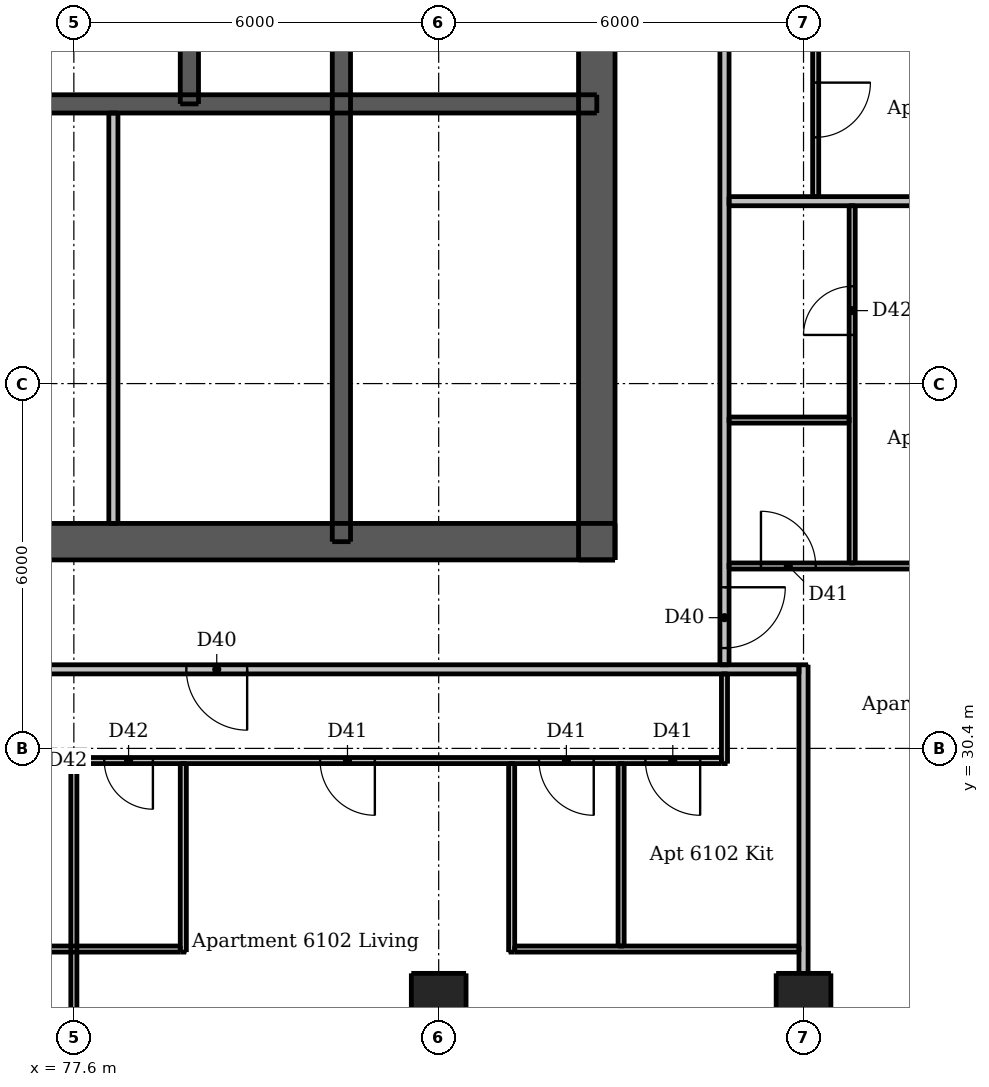
"""IFC4 building model, lengths in metres.
Left out: names, types, materials, properties, quantities, classifications, styles, units other than length and angle.
Written with IfcOpenShell. Run it as: python <this file> out.ifc"""

import sys

from ifc_helpers import new_model, si_unit, direction, frame, frame_2d, origin, origin_2d, place, context, subcontext, project, spatial, rectangle, extrude, element, fill, save


model = new_model("IFC4")
c1 = context("Model", 3, precision=1e-05, world=origin(), true_north=direction((0.0, 1.0)))
c2 = subcontext(c1, "Body", "Model", "MODEL_VIEW")
j1 = project(units=[si_unit("LENGTHUNIT", "METRE"), si_unit("PLANEANGLEUNIT", "RADIAN")], contexts=[c1])
p1 = place(None, origin())
s1 = spatial("IfcSite", under=j1, at=p1, CompositionType="ELEMENT")
p2 = place(p1, origin())
s2 = spatial("IfcBuilding", under=s1, at=p2, CompositionType="ELEMENT")
p3 = place(p2, frame((0.0, 0.0, 226.6)))
s3 = spatial("IfcBuildingStorey", under=s2, at=p3, CompositionType="ELEMENT", Elevation=226.6)
p4 = place(p3, frame((62.5, 33.8, 0.0), z_axis=(0.0, 0.0, 1.0), x_axis=(1.0, 0.0, 0.0)))
e1 = element("IfcWall", 1, at=p4, inside=s3, PredefinedType="SHEAR", context=c2, shape_type="SweptSolid", body=[
    extrude(rectangle(XDim=24.0, YDim=0.6, at=frame_2d((12.0, 0.0))), origin(), (0.0, 0.0, 1.0), 2.95),
])
p5 = place(p4, frame((1.925, 0.0, 0.0)))
e2 = element("IfcOpeningElement", 2, at=p5, cuts=e1, PredefinedType="OPENING", context=c2, shape_type="SweptSolid", body=[
    extrude(rectangle(XDim=1.1, YDim=2.1, at=frame_2d((0.55, 1.05))), frame((0.0, 0.31, 0.0), z_axis=(0.0, -1.0, 0.0), x_axis=(1.0, 0.0, 0.0)), (0.0, 0.0, 1.0), 0.62),
])
p6 = place(p4, frame((20.975, 0.0, 0.0)))
e3 = element("IfcOpeningElement", 3, at=p6, cuts=e1, PredefinedType="OPENING", context=c2, shape_type="SweptSolid", body=[
    extrude(rectangle(XDim=1.1, YDim=2.1, at=frame_2d((0.55, 1.05))), frame((0.0, 0.31, 0.0), z_axis=(0.0, -1.0, 0.0), x_axis=(1.0, 0.0, 0.0)), (0.0, 0.0, 1.0), 0.62),
])
p7 = place(p4, frame((8.0, 0.0, 0.0)))
e4 = element("IfcOpeningElement", 4, at=p7, cuts=e1, PredefinedType="OPENING", context=c2, shape_type="SweptSolid", body=[
    extrude(rectangle(XDim=1.1, YDim=2.1, at=frame_2d((0.55, 1.05))), frame((0.0, 0.31, 0.0), z_axis=(0.0, -1.0, 0.0), x_axis=(1.0, 0.0, 0.0)), (0.0, 0.0, 1.0), 0.62),
])
p8 = place(p4, frame((13.5, 0.0, 0.0)))
e5 = element("IfcOpeningElement", 5, at=p8, cuts=e1, PredefinedType="OPENING", context=c2, shape_type="SweptSolid", body=[
    extrude(rectangle(XDim=0.9, YDim=2.1, at=frame_2d((0.45, 1.05))), frame((0.0, 0.31, 0.0), z_axis=(0.0, -1.0, 0.0), x_axis=(1.0, 0.0, 0.0)), (0.0, 0.0, 1.0), 0.62),
])
p9 = place(p4, frame((17.1, 0.0, 0.0)))
e6 = element("IfcOpeningElement", 6, at=p9, cuts=e1, PredefinedType="OPENING", context=c2, shape_type="SweptSolid", body=[
    extrude(rectangle(XDim=0.9, YDim=2.1, at=frame_2d((0.45, 1.05))), frame((0.0, 0.31, 0.0), z_axis=(0.0, -1.0, 0.0), x_axis=(1.0, 0.0, 0.0)), (0.0, 0.0, 1.0), 0.62),
])
p10 = place(p3, frame((86.2, 33.5, 0.0), z_axis=(0.0, 0.0, 1.0), x_axis=(0.0, 1.0, 0.0)))
e7 = element("IfcWall", 7, at=p10, inside=s3, PredefinedType="SHEAR", context=c2, shape_type="SweptSolid", body=[
    extrude(rectangle(XDim=24.0, YDim=0.6, at=frame_2d((12.0, 0.0))), origin(), (0.0, 0.0, 1.0), 2.95),
])
p11 = place(p10, frame((11.2, 0.0, 0.0)))
e8 = element("IfcOpeningElement", 8, at=p11, cuts=e7, PredefinedType="OPENING", context=c2, shape_type="SweptSolid", body=[
    extrude(rectangle(XDim=1.6, YDim=2.1, at=frame_2d((0.8, 1.05))), frame((0.0, 0.31, 0.0), z_axis=(0.0, -1.0, 0.0), x_axis=(1.0, 0.0, 0.0)), (0.0, 0.0, 1.0), 0.62),
])
p12 = place(p3, frame((62.8, 41.0, 0.0), z_axis=(0.0, 0.0, 1.0), x_axis=(1.0, 0.0, 0.0)))
e9 = element("IfcWall", 9, at=p12, inside=s3, PredefinedType="SHEAR", context=c2, shape_type="SweptSolid", body=[
    extrude(rectangle(XDim=23.4, YDim=0.3, at=frame_2d((11.7, 0.0))), origin(), (0.0, 0.0, 1.0), 2.95),
])
p13 = place(p3, frame((82.0, 33.8, 0.0), z_axis=(0.0, 0.0, 1.0), x_axis=(0.0, 1.0, 0.0)))
e10 = element("IfcWall", 10, at=p13, inside=s3, PredefinedType="SHEAR", context=c2, shape_type="SweptSolid", body=[
    extrude(rectangle(XDim=10.1, YDim=0.3, at=frame_2d((5.05, 0.0))), origin(), (0.0, 0.0, 1.0), 2.95),
])
p14 = place(p3, frame((79.5, 41.0, 0.0), z_axis=(0.0, 0.0, 1.0), x_axis=(0.0, 1.0, 0.0)))
e11 = element("IfcWall", 11, at=p14, inside=s3, PredefinedType="SHEAR", context=c2, shape_type="SweptSolid", body=[
    extrude(rectangle(XDim=2.9, YDim=0.3, at=frame_2d((1.45, 0.0))), origin(), (0.0, 0.0, 1.0), 2.95),
])
for number, where, z_axis, x_axis in (
    (12, (83.6, 26.25, 0.0), (0.0, 0.0, 1.0), (1.0, 0.0, 0.0)),
    (13, (89.6, 26.25, 0.0), (0.0, 0.0, 1.0), (1.0, 0.0, 0.0)),
):
    element("IfcColumn", number, at=place(p3, frame(where, z_axis=z_axis, x_axis=x_axis)), inside=s3, PredefinedType="COLUMN", context=c2, shape_type="SweptSolid", body=[
        extrude(rectangle(XDim=0.9, YDim=0.9, at=origin_2d()), origin(), (0.0, 0.0, 1.0), 2.95),
    ])
p15 = place(p3, frame((78.25, 34.1, 0.0), z_axis=(0.0, 0.0, 1.0), x_axis=(0.0, 1.0, 0.0)))
e14 = element("IfcWall", 14, at=p15, inside=s3, PredefinedType="PLUMBINGWALL", context=c2, shape_type="SweptSolid", body=[
    extrude(rectangle(XDim=6.75, YDim=0.15, at=frame_2d((3.375, 0.0))), origin(), (0.0, 0.0, 1.0), 2.95),
])
p16 = place(p3, frame((77.6, 24.0, 0.0), z_axis=(0.0, 0.0, 1.0), x_axis=(0.0, 1.0, 0.0)))
e15 = element("IfcWall", 15, at=p16, inside=s3, PredefinedType="PARTITIONING", context=c2, shape_type="SweptSolid", body=[
    extrude(rectangle(XDim=6.15, YDim=0.1, at=frame_2d((3.075, 0.0))), origin(), (0.0, 0.0, 1.0), 2.332),
])
for number, where, z_axis, x_axis in (
    (16, (79.4, 27.05, 0.0), (0.0, 0.0, 1.0), (0.0, 1.0, 0.0)),
    (17, (84.8, 27.05, 0.0), (0.0, 0.0, 1.0), (0.0, 1.0, 0.0)),
):
    element("IfcWall", number, at=place(p3, frame(where, z_axis=z_axis, x_axis=x_axis)), inside=s3, PredefinedType="PARTITIONING", context=c2, shape_type="SweptSolid", body=[
        extrude(rectangle(XDim=3.1, YDim=0.1, at=frame_2d((1.55, 0.0))), origin(), (0.0, 0.0, 1.0), 2.95),
    ])
p17 = place(p3, frame((86.6, 27.15, 0.0), z_axis=(0.0, 0.0, 1.0), x_axis=(0.0, 1.0, 0.0)))
e18 = element("IfcWall", 18, at=p17, inside=s3, PredefinedType="PARTITIONING", context=c2, shape_type="SweptSolid", body=[
    extrude(rectangle(XDim=3.0, YDim=0.1, at=frame_2d((1.5, 0.0))), origin(), (0.0, 0.0, 1.0), 2.95),
])
p18 = place(p3, frame((88.3, 30.15, 0.0), z_axis=(0.0, 0.0, 1.0), x_axis=(0.0, 1.0, 0.0)))
e19 = element("IfcWall", 19, at=p18, inside=s3, PredefinedType="PARTITIONING", context=c2, shape_type="SweptSolid", body=[
    extrude(rectangle(XDim=1.475, YDim=0.1, at=frame_2d((0.738, 0.0))), origin(), (0.0, 0.0, 1.0), 2.95),
])
p19 = place(p3, frame((89.8, 60.325, 0.0), z_axis=(0.0, 0.0, 1.0), x_axis=(0.0, -1.0, 0.0)))
e20 = element("IfcWall", 20, at=p19, inside=s3, PredefinedType="PARTITIONING", context=c2, shape_type="SweptSolid", body=[
    extrude(rectangle(XDim=20.85, YDim=0.1, at=frame_2d((10.425, 0.0))), origin(), (0.0, 0.0, 1.0), 2.95),
])
p20 = place(p19, frame((6.075, 0.0, 0.0)))
e21 = element("IfcOpeningElement", 21, at=p20, cuts=e20, PredefinedType="OPENING", context=c2, shape_type="SweptSolid", body=[
    extrude(rectangle(XDim=0.9, YDim=2.1, at=frame_2d((0.45, 1.05))), frame((0.0, 0.06, 0.0), z_axis=(0.0, -1.0, 0.0), x_axis=(1.0, 0.0, 0.0)), (0.0, 0.0, 1.0), 0.12),
])
p21 = place(p19, frame((0.975, 0.0, 0.0)))
e22 = element("IfcOpeningElement", 22, at=p21, cuts=e20, PredefinedType="OPENING", context=c2, shape_type="SweptSolid", body=[
    extrude(rectangle(XDim=0.9, YDim=2.1, at=frame_2d((0.45, 1.05))), frame((0.0, 0.06, 0.0), z_axis=(0.0, -1.0, 0.0), x_axis=(1.0, 0.0, 0.0)), (0.0, 0.0, 1.0), 0.12),
])
p22 = place(p19, frame((10.625, 0.0, 0.0)))
e23 = element("IfcOpeningElement", 23, at=p22, cuts=e20, PredefinedType="OPENING", context=c2, shape_type="SweptSolid", body=[
    extrude(rectangle(XDim=0.8, YDim=2.1, at=frame_2d((0.4, 1.05))), frame((0.0, 0.06, 0.0), z_axis=(0.0, -1.0, 0.0), x_axis=(1.0, 0.0, 0.0)), (0.0, 0.0, 1.0), 0.12),
])
p23 = place(p19, frame((18.975, 0.0, 0.0)))
e24 = element("IfcOpeningElement", 24, at=p23, cuts=e20, PredefinedType="OPENING", context=c2, shape_type="SweptSolid", body=[
    extrude(rectangle(XDim=0.9, YDim=2.1, at=frame_2d((0.45, 1.05))), frame((0.0, 0.06, 0.0), z_axis=(0.0, -1.0, 0.0), x_axis=(1.0, 0.0, 0.0)), (0.0, 0.0, 1.0), 0.12),
])
p24 = place(p19, frame((15.675, 0.0, 0.0)))
e25 = element("IfcOpeningElement", 25, at=p24, cuts=e20, PredefinedType="OPENING", context=c2, shape_type="SweptSolid", body=[
    extrude(rectangle(XDim=0.9, YDim=2.1, at=frame_2d((0.45, 1.05))), frame((0.0, 0.06, 0.0), z_axis=(0.0, -1.0, 0.0), x_axis=(1.0, 0.0, 0.0)), (0.0, 0.0, 1.0), 0.12),
])
p25 = place(p19, frame((12.725, 0.0, 0.0)))
e26 = element("IfcOpeningElement", 26, at=p25, cuts=e20, PredefinedType="OPENING", context=c2, shape_type="SweptSolid", body=[
    extrude(rectangle(XDim=0.8, YDim=2.1, at=frame_2d((0.4, 1.05))), frame((0.0, 0.06, 0.0), z_axis=(0.0, -1.0, 0.0), x_axis=(1.0, 0.0, 0.0)), (0.0, 0.0, 1.0), 0.12),
])
p26 = place(p3, frame((90.4, 33.45, 0.0), z_axis=(0.0, 0.0, 1.0), x_axis=(0.0, 1.0, 0.0)))
e27 = element("IfcWall", 27, at=p26, inside=s3, PredefinedType="PARTITIONING", context=c2, shape_type="SweptSolid", body=[
    extrude(rectangle(XDim=5.875, YDim=0.1, at=frame_2d((2.938, 0.0))), origin(), (0.0, 0.0, 1.0), 2.95),
])
p27 = place(p26, frame((3.75, 0.0, 0.0)))
e28 = element("IfcOpeningElement", 28, at=p27, cuts=e27, PredefinedType="OPENING", context=c2, shape_type="SweptSolid", body=[
    extrude(rectangle(XDim=0.8, YDim=2.1, at=frame_2d((0.4, 1.05))), frame((0.0, 0.06, 0.0), z_axis=(0.0, -1.0, 0.0), x_axis=(1.0, 0.0, 0.0)), (0.0, 0.0, 1.0), 0.12),
])
p28 = place(p3, frame((88.375, 35.8, 0.0), z_axis=(0.0, 0.0, 1.0), x_axis=(1.0, 0.0, 0.0)))
e29 = element("IfcWall", 29, at=p28, inside=s3, PredefinedType="PARTITIONING", context=c2, shape_type="SweptSolid", body=[
    extrude(rectangle(XDim=1.975, YDim=0.1, at=frame_2d((0.988, 0.0))), origin(), (0.0, 0.0, 1.0), 2.95),
])
p29 = place(p3, frame((88.375, 33.4, 0.0), z_axis=(0.0, 0.0, 1.0), x_axis=(1.0, 0.0, 0.0)))
e30 = element("IfcWall", 30, at=p29, inside=s3, PredefinedType="PARTITIONING", context=c2, shape_type="SweptSolid", body=[
    extrude(rectangle(XDim=7.625, YDim=0.1, at=frame_2d((3.812, 0.0))), origin(), (0.0, 0.0, 1.0), 2.95),
])
p30 = place(p29, frame((0.525, 0.0, 0.0)))
e31 = element("IfcOpeningElement", 31, at=p30, cuts=e30, PredefinedType="OPENING", context=c2, shape_type="SweptSolid", body=[
    extrude(rectangle(XDim=0.9, YDim=2.1, at=frame_2d((0.45, 1.05))), frame((0.0, 0.06, 0.0), z_axis=(0.0, -1.0, 0.0), x_axis=(1.0, 0.0, 0.0)), (0.0, 0.0, 1.0), 0.12),
])
p31 = place(p29, frame((4.375, 0.0, 0.0)))
e32 = element("IfcOpeningElement", 32, at=p31, cuts=e30, PredefinedType="OPENING", context=c2, shape_type="SweptSolid", body=[
    extrude(rectangle(XDim=0.9, YDim=2.1, at=frame_2d((0.45, 1.05))), frame((0.0, 0.06, 0.0), z_axis=(0.0, -1.0, 0.0), x_axis=(1.0, 0.0, 0.0)), (0.0, 0.0, 1.0), 0.12),
])
p32 = place(p3, frame((88.25, 30.2, 0.0), z_axis=(0.0, 0.0, 1.0), x_axis=(-1.0, 0.0, 0.0)))
e33 = element("IfcWall", 33, at=p32, inside=s3, PredefinedType="PARTITIONING", context=c2, shape_type="SweptSolid", body=[
    extrude(rectangle(XDim=16.575, YDim=0.1, at=frame_2d((8.288, 0.0))), origin(), (0.0, 0.0, 1.0), 2.95),
])
p33 = place(p32, frame((5.7, 0.0, 0.0)))
e34 = element("IfcOpeningElement", 34, at=p33, cuts=e33, PredefinedType="OPENING", context=c2, shape_type="SweptSolid", body=[
    extrude(rectangle(XDim=0.9, YDim=2.1, at=frame_2d((0.45, 1.05))), frame((0.0, 0.06, 0.0), z_axis=(0.0, -1.0, 0.0), x_axis=(1.0, 0.0, 0.0)), (0.0, 0.0, 1.0), 0.12),
])
p34 = place(p32, frame((0.35, 0.0, 0.0)))
e35 = element("IfcOpeningElement", 35, at=p34, cuts=e33, PredefinedType="OPENING", context=c2, shape_type="SweptSolid", body=[
    extrude(rectangle(XDim=0.9, YDim=2.1, at=frame_2d((0.45, 1.05))), frame((0.0, 0.06, 0.0), z_axis=(0.0, -1.0, 0.0), x_axis=(1.0, 0.0, 0.0)), (0.0, 0.0, 1.0), 0.12),
])
p35 = place(p32, frame((2.1, 0.0, 0.0)))
e36 = element("IfcOpeningElement", 36, at=p35, cuts=e33, PredefinedType="OPENING", context=c2, shape_type="SweptSolid", body=[
    extrude(rectangle(XDim=0.9, YDim=2.1, at=frame_2d((0.45, 1.05))), frame((0.0, 0.06, 0.0), z_axis=(0.0, -1.0, 0.0), x_axis=(1.0, 0.0, 0.0)), (0.0, 0.0, 1.0), 0.12),
])
p36 = place(p32, frame((9.35, 0.0, 0.0)))
e37 = element("IfcOpeningElement", 37, at=p36, cuts=e33, PredefinedType="OPENING", context=c2, shape_type="SweptSolid", body=[
    extrude(rectangle(XDim=0.8, YDim=2.1, at=frame_2d((0.4, 1.05))), frame((0.0, 0.06, 0.0), z_axis=(0.0, -1.0, 0.0), x_axis=(1.0, 0.0, 0.0)), (0.0, 0.0, 1.0), 0.12),
])
p37 = place(p32, frame((14.4, 0.0, 0.0)))
e38 = element("IfcOpeningElement", 38, at=p37, cuts=e33, PredefinedType="OPENING", context=c2, shape_type="SweptSolid", body=[
    extrude(rectangle(XDim=0.9, YDim=2.1, at=frame_2d((0.45, 1.05))), frame((0.0, 0.06, 0.0), z_axis=(0.0, -1.0, 0.0), x_axis=(1.0, 0.0, 0.0)), (0.0, 0.0, 1.0), 0.12),
])
p38 = place(p32, frame((11.45, 0.0, 0.0)))
e39 = element("IfcOpeningElement", 39, at=p38, cuts=e33, PredefinedType="OPENING", context=c2, shape_type="SweptSolid", body=[
    extrude(rectangle(XDim=0.8, YDim=2.1, at=frame_2d((0.4, 1.05))), frame((0.0, 0.06, 0.0), z_axis=(0.0, -1.0, 0.0), x_axis=(1.0, 0.0, 0.0)), (0.0, 0.0, 1.0), 0.12),
])
p39 = place(p3, frame((75.25, 27.1, 0.0), z_axis=(0.0, 0.0, 1.0), x_axis=(1.0, 0.0, 0.0)))
e40 = element("IfcWall", 40, at=p39, inside=s3, PredefinedType="PARTITIONING", context=c2, shape_type="SweptSolid", body=[
    extrude(rectangle(XDim=4.1, YDim=0.1, at=frame_2d((2.05, 0.0))), origin(), (0.0, 0.0, 1.0), 2.95),
])
p40 = place(p3, frame((84.85, 27.1, 0.0), z_axis=(0.0, 0.0, 1.0), x_axis=(1.0, 0.0, 0.0)))
e41 = element("IfcWall", 41, at=p40, inside=s3, PredefinedType="PARTITIONING", context=c2, shape_type="SweptSolid", body=[
    extrude(rectangle(XDim=4.675, YDim=0.1, at=frame_2d((2.337, 0.0))), origin(), (0.0, 0.0, 1.0), 2.95),
])
p41 = place(p3, frame((88.3, 61.175, 0.0), z_axis=(0.0, 0.0, 1.0), x_axis=(0.0, -1.0, 0.0)))
e42 = element("IfcWall", 42, at=p41, inside=s3, PredefinedType="PARTITIONING", context=c2, shape_type="SweptSolid", body=[
    extrude(rectangle(XDim=29.4, YDim=0.15, at=frame_2d((14.7, 0.0))), origin(), (0.0, 0.0, 1.0), 2.95),
])
p42 = place(p41, frame((28.125, 0.0, 0.0)))
e43 = element("IfcOpeningElement", 43, at=p42, cuts=e42, PredefinedType="OPENING", context=c2, shape_type="SweptSolid", body=[
    extrude(rectangle(XDim=1.0, YDim=2.1, at=frame_2d((0.5, 1.05))), frame((0.0, 0.085, 0.0), z_axis=(0.0, -1.0, 0.0), x_axis=(1.0, 0.0, 0.0)), (0.0, 0.0, 1.0), 0.17),
])
p43 = place(p41, frame((10.775, 0.0, 0.0)))
e44 = element("IfcOpeningElement", 44, at=p43, cuts=e42, PredefinedType="OPENING", context=c2, shape_type="SweptSolid", body=[
    extrude(rectangle(XDim=1.0, YDim=2.1, at=frame_2d((0.5, 1.05))), frame((0.0, 0.085, 0.0), z_axis=(0.0, -1.0, 0.0), x_axis=(1.0, 0.0, 0.0)), (0.0, 0.0, 1.0), 0.17),
])
p44 = place(p3, frame((89.6, 24.0, 0.0), z_axis=(0.0, 0.0, 1.0), x_axis=(0.0, 1.0, 0.0)))
e45 = element("IfcWall", 45, at=p44, inside=s3, PredefinedType="PARTITIONING", context=c2, shape_type="SweptSolid", body=[
    extrude(rectangle(XDim=7.775, YDim=0.15, at=frame_2d((3.887, 0.0))), origin(), (0.0, 0.0, 1.0), 2.332),
])
p45 = place(p3, frame((88.375, 39.4, 0.0), z_axis=(0.0, 0.0, 1.0), x_axis=(1.0, 0.0, 0.0)))
e46 = element("IfcWall", 46, at=p45, inside=s3, PredefinedType="PARTITIONING", context=c2, shape_type="SweptSolid", body=[
    extrude(rectangle(XDim=7.625, YDim=0.15, at=frame_2d((3.812, 0.0))), origin(), (0.0, 0.0, 1.0), 2.95),
])
p46 = place(p3, frame((89.525, 31.7, 0.0), z_axis=(0.0, 0.0, 1.0), x_axis=(-1.0, 0.0, 0.0)))
e47 = element("IfcWall", 47, at=p46, inside=s3, PredefinedType="PARTITIONING", context=c2, shape_type="SweptSolid", body=[
    extrude(rectangle(XDim=30.55, YDim=0.15, at=frame_2d((15.275, 0.0))), origin(), (0.0, 0.0, 1.0), 2.95),
])
p47 = place(p46, frame((26.775, 0.0, 0.0)))
e48 = element("IfcOpeningElement", 48, at=p47, cuts=e47, PredefinedType="OPENING", context=c2, shape_type="SweptSolid", body=[
    extrude(rectangle(XDim=1.0, YDim=2.1, at=frame_2d((0.5, 1.05))), frame((0.0, 0.085, 0.0), z_axis=(0.0, -1.0, 0.0), x_axis=(1.0, 0.0, 0.0)), (0.0, 0.0, 1.0), 0.17),
])
p48 = place(p46, frame((9.075, 0.0, 0.0)))
e49 = element("IfcOpeningElement", 49, at=p48, cuts=e47, PredefinedType="OPENING", context=c2, shape_type="SweptSolid", body=[
    extrude(rectangle(XDim=1.0, YDim=2.1, at=frame_2d((0.5, 1.05))), frame((0.0, 0.085, 0.0), z_axis=(0.0, -1.0, 0.0), x_axis=(1.0, 0.0, 0.0)), (0.0, 0.0, 1.0), 0.17),
])
p49 = place(p6, origin())
e50 = element("IfcDoor", 50, at=p49, inside=s3, OperationType="SINGLE_SWING_RIGHT", PredefinedType="DOOR", context=c2, shape_type="SweptSolid", body=[
    extrude(rectangle(XDim=1.1, YDim=2.1, at=frame_2d((0.55, 1.05))), frame((0.0, 0.288, 0.0), z_axis=(0.0, -1.0, 0.0), x_axis=(1.0, 0.0, 0.0)), (0.0, 0.0, 1.0), 0.05),
])
fill(e3, e50)
p50 = place(p9, origin())
e51 = element("IfcDoor", 51, at=p50, inside=s3, OperationType="SINGLE_SWING_LEFT", PredefinedType="DOOR", context=c2, shape_type="SweptSolid", body=[
    extrude(rectangle(XDim=0.9, YDim=2.1, at=frame_2d((0.45, 1.05))), frame((0.0, 0.288, 0.0), z_axis=(0.0, -1.0, 0.0), x_axis=(1.0, 0.0, 0.0)), (0.0, 0.0, 1.0), 0.05),
])
fill(e6, e51)
p51 = place(p48, origin())
e52 = element("IfcDoor", 52, at=p51, inside=s3, OperationType="SINGLE_SWING_LEFT", PredefinedType="DOOR", context=c2, shape_type="SweptSolid", body=[
    extrude(rectangle(XDim=1.0, YDim=2.1, at=frame_2d((0.5, 1.05))), frame((0.0, 0.025, 0.0), z_axis=(0.0, -1.0, 0.0), x_axis=(1.0, 0.0, 0.0)), (0.0, 0.0, 1.0), 0.05),
])
fill(e49, e52)
p52 = place(p33, origin())
e53 = element("IfcDoor", 53, at=p52, inside=s3, OperationType="SINGLE_SWING_LEFT", PredefinedType="DOOR", context=c2, shape_type="SweptSolid", body=[
    extrude(rectangle(XDim=0.9, YDim=2.1, at=frame_2d((0.45, 1.05))), frame((0.0, 0.025, 0.0), z_axis=(0.0, -1.0, 0.0), x_axis=(1.0, 0.0, 0.0)), (0.0, 0.0, 1.0), 0.05),
])
fill(e34, e53)
p53 = place(p34, origin())
e54 = element("IfcDoor", 54, at=p53, inside=s3, OperationType="SINGLE_SWING_LEFT", PredefinedType="DOOR", context=c2, shape_type="SweptSolid", body=[
    extrude(rectangle(XDim=0.9, YDim=2.1, at=frame_2d((0.45, 1.05))), frame((0.0, 0.025, 0.0), z_axis=(0.0, -1.0, 0.0), x_axis=(1.0, 0.0, 0.0)), (0.0, 0.0, 1.0), 0.05),
])
fill(e35, e54)
p54 = place(p35, origin())
e55 = element("IfcDoor", 55, at=p54, inside=s3, OperationType="SINGLE_SWING_LEFT", PredefinedType="DOOR", context=c2, shape_type="SweptSolid", body=[
    extrude(rectangle(XDim=0.9, YDim=2.1, at=frame_2d((0.45, 1.05))), frame((0.0, 0.025, 0.0), z_axis=(0.0, -1.0, 0.0), x_axis=(1.0, 0.0, 0.0)), (0.0, 0.0, 1.0), 0.05),
])
fill(e36, e55)
p55 = place(p36, origin())
e56 = element("IfcDoor", 56, at=p55, inside=s3, OperationType="SINGLE_SWING_LEFT", PredefinedType="DOOR", context=c2, shape_type="SweptSolid", body=[
    extrude(rectangle(XDim=0.8, YDim=2.1, at=frame_2d((0.4, 1.05))), frame((0.0, 0.025, 0.0), z_axis=(0.0, -1.0, 0.0), x_axis=(1.0, 0.0, 0.0)), (0.0, 0.0, 1.0), 0.05),
])
fill(e37, e56)
p56 = place(p42, origin())
e57 = element("IfcDoor", 57, at=p56, inside=s3, OperationType="SINGLE_SWING_LEFT", PredefinedType="DOOR", context=c2, shape_type="SweptSolid", body=[
    extrude(rectangle(XDim=1.0, YDim=2.1, at=frame_2d((0.5, 1.05))), frame((0.0, 0.025, 0.0), z_axis=(0.0, -1.0, 0.0), x_axis=(1.0, 0.0, 0.0)), (0.0, 0.0, 1.0), 0.05),
])
fill(e43, e57)
p57 = place(p30, origin())
e58 = element("IfcDoor", 58, at=p57, inside=s3, OperationType="SINGLE_SWING_LEFT", PredefinedType="DOOR", context=c2, shape_type="SweptSolid", body=[
    extrude(rectangle(XDim=0.9, YDim=2.1, at=frame_2d((0.45, 1.05))), frame((0.0, 0.025, 0.0), z_axis=(0.0, -1.0, 0.0), x_axis=(1.0, 0.0, 0.0)), (0.0, 0.0, 1.0), 0.05),
])
fill(e31, e58)
p58 = place(p27, origin())
e59 = element("IfcDoor", 59, at=p58, inside=s3, OperationType="SINGLE_SWING_LEFT", PredefinedType="DOOR", context=c2, shape_type="SweptSolid", body=[
    extrude(rectangle(XDim=0.8, YDim=2.1, at=frame_2d((0.4, 1.05))), frame((0.0, 0.025, 0.0), z_axis=(0.0, -1.0, 0.0), x_axis=(1.0, 0.0, 0.0)), (0.0, 0.0, 1.0), 0.05),
])
fill(e28, e59)
p59 = place(p23, origin())
e60 = element("IfcDoor", 60, at=p59, inside=s3, OperationType="SINGLE_SWING_LEFT", PredefinedType="DOOR", context=c2, shape_type="SweptSolid", body=[
    extrude(rectangle(XDim=0.9, YDim=2.1, at=frame_2d((0.45, 1.05))), frame((0.0, 0.025, 0.0), z_axis=(0.0, -1.0, 0.0), x_axis=(1.0, 0.0, 0.0)), (0.0, 0.0, 1.0), 0.05),
])
fill(e24, e60)
save(model, sys.argv[1])
